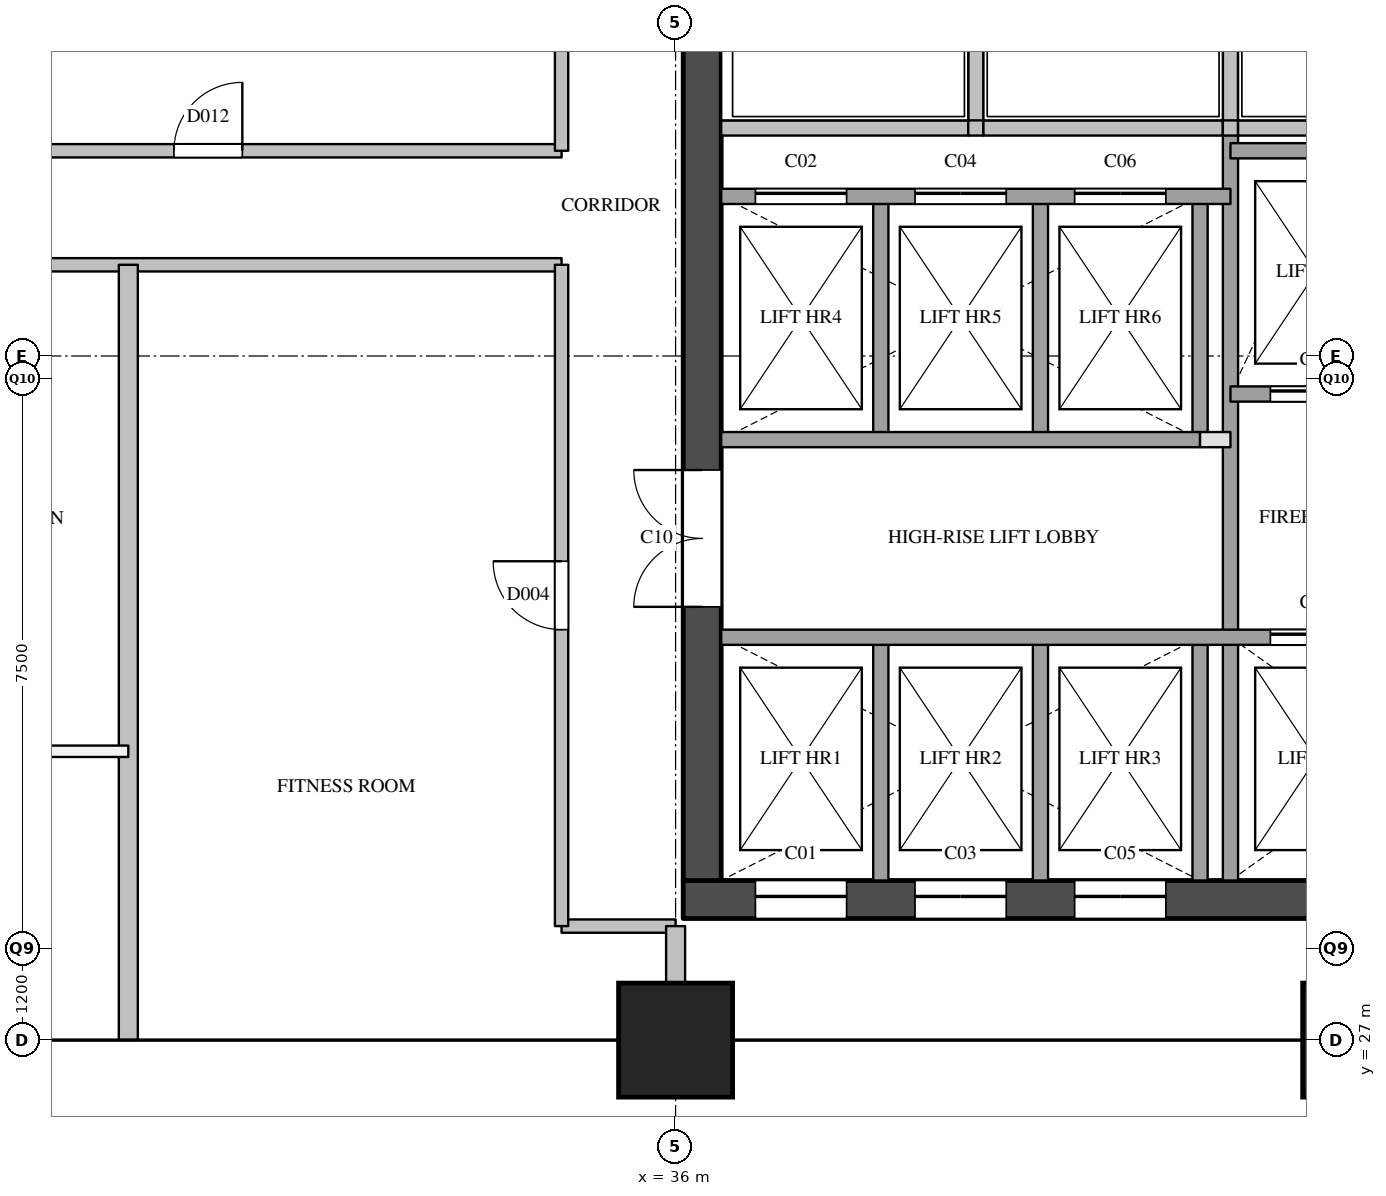
"""IFC4 building model, lengths in metres.
Left out: names, types, materials, properties, quantities, classifications, styles, units other than length and angle.
Written with IfcOpenShell. Run it as: python <this file> out.ifc"""

import sys

from ifc_helpers import new_model, si_unit, direction, frame, frame_2d, origin, origin_2d, place, context, subcontext, project, spatial, rectangle, extrude, element, fill, save


model = new_model("IFC4")
c1 = context("Model", 3, precision=1e-05, world=origin(), true_north=direction((0.0, 1.0)))
c2 = subcontext(c1, "Body", "Model", "MODEL_VIEW")
j1 = project(units=[si_unit("LENGTHUNIT", "METRE"), si_unit("PLANEANGLEUNIT", "RADIAN")], contexts=[c1])
p1 = place(None, origin())
s1 = spatial("IfcSite", under=j1, at=p1, CompositionType="ELEMENT")
p2 = place(p1, origin())
s2 = spatial("IfcBuilding", under=s1, at=p2, CompositionType="ELEMENT")
p3 = place(p2, frame((0.0, 0.0, 146.6)))
s3 = spatial("IfcBuildingStorey", under=s2, at=p3, CompositionType="ELEMENT", Elevation=146.6)
for number, where, z_axis, x_axis in (
    (1, (36.0, 27.0, 0.0), (0.0, 0.0, 1.0), (1.0, 0.0, 0.0)),
    (2, (45.0, 27.0, 0.0), (0.0, 0.0, 1.0), (1.0, 0.0, 0.0)),
):
    element("IfcColumn", number, at=place(p3, frame(where, z_axis=z_axis, x_axis=x_axis)), inside=s3, PredefinedType="COLUMN", context=c2, shape_type="SweptSolid", body=[
        extrude(rectangle(XDim=1.5, YDim=1.5, at=origin_2d()), origin(), (0.0, 0.0, 1.0), 3.9),
    ])
p4 = place(p3, frame((36.1, 28.85, 0.0), z_axis=(0.0, 0.0, 1.0), x_axis=(1.0, 0.0, 0.0)))
e3 = element("IfcWall", 3, at=p4, inside=s3, PredefinedType="SHEAR", context=c2, shape_type="SweptSolid", body=[
    extrude(rectangle(XDim=12.2, YDim=0.5, at=frame_2d((6.1, 0.0))), origin(), (0.0, 0.0, 1.0), 3.6),
])
p5 = place(p4, frame((0.95, 0.0, 0.0)))
e4 = element("IfcOpeningElement", 4, at=p5, cuts=e3, PredefinedType="OPENING", context=c2, shape_type="SweptSolid", body=[
    extrude(rectangle(XDim=1.2, YDim=2.1, at=frame_2d((0.6, 1.05))), frame((0.0, 0.26, 0.0), z_axis=(0.0, -1.0, 0.0), x_axis=(1.0, 0.0, 0.0)), (0.0, 0.0, 1.0), 0.52),
])
p6 = place(p4, frame((3.05, 0.0, 0.0)))
e5 = element("IfcOpeningElement", 5, at=p6, cuts=e3, PredefinedType="OPENING", context=c2, shape_type="SweptSolid", body=[
    extrude(rectangle(XDim=1.2, YDim=2.1, at=frame_2d((0.6, 1.05))), frame((0.0, 0.26, 0.0), z_axis=(0.0, -1.0, 0.0), x_axis=(1.0, 0.0, 0.0)), (0.0, 0.0, 1.0), 0.52),
])
p7 = place(p4, frame((5.15, 0.0, 0.0)))
e6 = element("IfcOpeningElement", 6, at=p7, cuts=e3, PredefinedType="OPENING", context=c2, shape_type="SweptSolid", body=[
    extrude(rectangle(XDim=1.2, YDim=2.1, at=frame_2d((0.6, 1.05))), frame((0.0, 0.26, 0.0), z_axis=(0.0, -1.0, 0.0), x_axis=(1.0, 0.0, 0.0)), (0.0, 0.0, 1.0), 0.52),
])
p8 = place(p3, frame((36.35, 29.1, 0.0), z_axis=(0.0, 0.0, 1.0), x_axis=(0.0, 1.0, 0.0)))
e7 = element("IfcWall", 7, at=p8, inside=s3, PredefinedType="SHEAR", context=c2, shape_type="SweptSolid", body=[
    extrude(rectangle(XDim=20.3, YDim=0.5, at=frame_2d((10.15, 0.0))), origin(), (0.0, 0.0, 1.0), 3.6),
])
p9 = place(p8, frame((3.6, 0.0, 0.0)))
e8 = element("IfcOpeningElement", 8, at=p9, cuts=e7, PredefinedType="OPENING", context=c2, shape_type="SweptSolid", body=[
    extrude(rectangle(XDim=1.8, YDim=2.1, at=frame_2d((0.9, 1.05))), frame((0.0, 0.26, 0.0), z_axis=(0.0, -1.0, 0.0), x_axis=(1.0, 0.0, 0.0)), (0.0, 0.0, 1.0), 0.52),
])
p10 = place(p8, frame((16.4, 0.0, 0.0)))
e9 = element("IfcOpeningElement", 9, at=p10, cuts=e7, PredefinedType="OPENING", context=c2, shape_type="SweptSolid", body=[
    extrude(rectangle(XDim=1.0, YDim=2.1, at=frame_2d((0.5, 1.05))), frame((0.0, 0.26, 0.0), z_axis=(0.0, -1.0, 0.0), x_axis=(1.0, 0.0, 0.0)), (0.0, 0.0, 1.0), 0.52),
])
p11 = place(p3, frame((38.7, 29.1, 0.0), z_axis=(0.0, 0.0, 1.0), x_axis=(0.0, 1.0, 0.0)))
e10 = element("IfcWall", 10, at=p11, inside=s3, PredefinedType="SOLIDWALL", context=c2, shape_type="SweptSolid", body=[
    extrude(rectangle(XDim=3.2, YDim=0.2, at=frame_2d((1.6, 0.0))), origin(), (0.0, 0.0, 1.0), 3.6),
])
p12 = place(p3, frame((38.7, 34.9, 0.0), z_axis=(0.0, 0.0, 1.0), x_axis=(0.0, 1.0, 0.0)))
e11 = element("IfcWall", 11, at=p12, inside=s3, PredefinedType="SOLIDWALL", context=c2, shape_type="SweptSolid", body=[
    extrude(rectangle(XDim=3.2, YDim=0.2, at=frame_2d((1.6, 0.0))), origin(), (0.0, 0.0, 1.0), 3.6),
])
p13 = place(p3, frame((39.95, 39.0, 0.0), z_axis=(0.0, 0.0, 1.0), x_axis=(0.0, 1.0, 0.0)))
e12 = element("IfcWall", 12, at=p13, inside=s3, PredefinedType="SOLIDWALL", context=c2, shape_type="SweptSolid", body=[
    extrude(rectangle(XDim=1.78, YDim=0.2, at=frame_2d((0.89, 0.0))), origin(), (0.0, 0.0, 1.0), 3.6),
])
p14 = place(p3, frame((40.8, 29.1, 0.0), z_axis=(0.0, 0.0, 1.0), x_axis=(0.0, 1.0, 0.0)))
e13 = element("IfcWall", 13, at=p14, inside=s3, PredefinedType="SOLIDWALL", context=c2, shape_type="SweptSolid", body=[
    extrude(rectangle(XDim=3.2, YDim=0.2, at=frame_2d((1.6, 0.0))), origin(), (0.0, 0.0, 1.0), 3.6),
])
p15 = place(p3, frame((40.8, 34.9, 0.0), z_axis=(0.0, 0.0, 1.0), x_axis=(0.0, 1.0, 0.0)))
e14 = element("IfcWall", 14, at=p15, inside=s3, PredefinedType="SOLIDWALL", context=c2, shape_type="SweptSolid", body=[
    extrude(rectangle(XDim=3.2, YDim=0.2, at=frame_2d((1.6, 0.0))), origin(), (0.0, 0.0, 1.0), 3.6),
])
p16 = place(p3, frame((42.9, 29.1, 0.0), z_axis=(0.0, 0.0, 1.0), x_axis=(0.0, 1.0, 0.0)))
e15 = element("IfcWall", 15, at=p16, inside=s3, PredefinedType="SOLIDWALL", context=c2, shape_type="SweptSolid", body=[
    extrude(rectangle(XDim=3.2, YDim=0.2, at=frame_2d((1.6, 0.0))), origin(), (0.0, 0.0, 1.0), 3.6),
])
p17 = place(p3, frame((42.9, 34.9, 0.0), z_axis=(0.0, 0.0, 1.0), x_axis=(0.0, 1.0, 0.0)))
e16 = element("IfcWall", 16, at=p17, inside=s3, PredefinedType="SOLIDWALL", context=c2, shape_type="SweptSolid", body=[
    extrude(rectangle(XDim=3.2, YDim=0.2, at=frame_2d((1.6, 0.0))), origin(), (0.0, 0.0, 1.0), 3.6),
])
p18 = place(p3, frame((43.3, 29.1, 0.0), z_axis=(0.0, 0.0, 1.0), x_axis=(0.0, 1.0, 0.0)))
e17 = element("IfcWall", 17, at=p18, inside=s3, PredefinedType="SOLIDWALL", context=c2, shape_type="SweptSolid", body=[
    extrude(rectangle(XDim=9.9, YDim=0.2, at=frame_2d((4.95, 0.0))), origin(), (0.0, 0.0, 1.0), 3.6),
])
p19 = place(p3, frame((43.3, 39.0, 0.0), z_axis=(0.0, 0.0, 1.0), x_axis=(0.0, 1.0, 0.0)))
e18 = element("IfcWall", 18, at=p19, inside=s3, PredefinedType="SOLIDWALL", context=c2, shape_type="SweptSolid", body=[
    extrude(rectangle(XDim=1.78, YDim=0.2, at=frame_2d((0.89, 0.0))), origin(), (0.0, 0.0, 1.0), 3.6),
])
p20 = place(p3, frame((36.6, 32.3, 0.0), z_axis=(0.0, 0.0, 1.0), x_axis=(1.0, 0.0, 0.0)))
e19 = element("IfcWall", 19, at=p20, inside=s3, PredefinedType="SOLIDWALL", context=c2, shape_type="SweptSolid", body=[
    extrude(rectangle(XDim=11.2, YDim=0.2, at=frame_2d((5.6, 0.0))), origin(), (0.0, 0.0, 1.0), 3.6),
])
p21 = place(p20, frame((7.225, 0.0, 0.0)))
e20 = element("IfcOpeningElement", 20, at=p21, cuts=e19, PredefinedType="OPENING", context=c2, shape_type="SweptSolid", body=[
    extrude(rectangle(XDim=1.2, YDim=2.1, at=frame_2d((0.6, 1.05))), frame((0.0, 0.11, 0.0), z_axis=(0.0, -1.0, 0.0), x_axis=(1.0, 0.0, 0.0)), (0.0, 0.0, 1.0), 0.22),
])
p22 = place(p20, frame((9.475, 0.0, 0.0)))
e21 = element("IfcOpeningElement", 21, at=p22, cuts=e19, PredefinedType="OPENING", context=c2, shape_type="SweptSolid", body=[
    extrude(rectangle(XDim=1.2, YDim=2.1, at=frame_2d((0.6, 1.05))), frame((0.0, 0.11, 0.0), z_axis=(0.0, -1.0, 0.0), x_axis=(1.0, 0.0, 0.0)), (0.0, 0.0, 1.0), 0.22),
])
p23 = place(p3, frame((42.9, 34.9, 0.0), z_axis=(0.0, 0.0, 1.0), x_axis=(1.0, 0.0, 0.0)))
e22 = element("IfcWall", 22, at=p23, inside=s3, PredefinedType="PARTITIONING", context=c2, shape_type="SweptSolid", body=[
    extrude(rectangle(XDim=0.4, YDim=0.2, at=frame_2d((0.2, 0.0))), origin(), (0.0, 0.0, 1.0), 3.6),
])
p24 = place(p3, frame((36.6, 34.9, 0.0), z_axis=(0.0, 0.0, 1.0), x_axis=(1.0, 0.0, 0.0)))
e23 = element("IfcWall", 23, at=p24, inside=s3, PredefinedType="SOLIDWALL", context=c2, shape_type="SweptSolid", body=[
    extrude(rectangle(XDim=6.3, YDim=0.2, at=frame_2d((3.15, 0.0))), origin(), (0.0, 0.0, 1.0), 3.6),
])
p25 = place(p3, frame((43.3, 35.5, 0.0), z_axis=(0.0, 0.0, 1.0), x_axis=(1.0, 0.0, 0.0)))
e24 = element("IfcWall", 24, at=p25, inside=s3, PredefinedType="SOLIDWALL", context=c2, shape_type="SweptSolid", body=[
    extrude(rectangle(XDim=4.5, YDim=0.2, at=frame_2d((2.25, 0.0))), origin(), (0.0, 0.0, 1.0), 3.6),
])
p26 = place(p25, frame((0.525, 0.0, 0.0)))
e25 = element("IfcOpeningElement", 25, at=p26, cuts=e24, PredefinedType="OPENING", context=c2, shape_type="SweptSolid", body=[
    extrude(rectangle(XDim=1.2, YDim=2.1, at=frame_2d((0.6, 1.05))), frame((0.0, 0.11, 0.0), z_axis=(0.0, -1.0, 0.0), x_axis=(1.0, 0.0, 0.0)), (0.0, 0.0, 1.0), 0.22),
])
p27 = place(p25, frame((3.025, 0.0, 0.0)))
e26 = element("IfcOpeningElement", 26, at=p27, cuts=e24, PredefinedType="OPENING", context=c2, shape_type="SweptSolid", body=[
    extrude(rectangle(XDim=0.7, YDim=2.1, at=frame_2d((0.35, 1.05))), frame((0.0, 0.11, 0.0), z_axis=(0.0, -1.0, 0.0), x_axis=(1.0, 0.0, 0.0)), (0.0, 0.0, 1.0), 0.22),
])
p28 = place(p3, frame((36.6, 38.1, 0.0), z_axis=(0.0, 0.0, 1.0), x_axis=(1.0, 0.0, 0.0)))
e27 = element("IfcWall", 27, at=p28, inside=s3, PredefinedType="SOLIDWALL", context=c2, shape_type="SweptSolid", body=[
    extrude(rectangle(XDim=6.7, YDim=0.2, at=frame_2d((3.35, 0.0))), origin(), (0.0, 0.0, 1.0), 3.6),
])
p29 = place(p28, frame((0.45, 0.0, 0.0)))
e28 = element("IfcOpeningElement", 28, at=p29, cuts=e27, PredefinedType="OPENING", context=c2, shape_type="SweptSolid", body=[
    extrude(rectangle(XDim=1.2, YDim=2.1, at=frame_2d((0.6, 1.05))), frame((0.0, 0.11, 0.0), z_axis=(0.0, -1.0, 0.0), x_axis=(1.0, 0.0, 0.0)), (0.0, 0.0, 1.0), 0.22),
])
p30 = place(p28, frame((2.55, 0.0, 0.0)))
e29 = element("IfcOpeningElement", 29, at=p30, cuts=e27, PredefinedType="OPENING", context=c2, shape_type="SweptSolid", body=[
    extrude(rectangle(XDim=1.2, YDim=2.1, at=frame_2d((0.6, 1.05))), frame((0.0, 0.11, 0.0), z_axis=(0.0, -1.0, 0.0), x_axis=(1.0, 0.0, 0.0)), (0.0, 0.0, 1.0), 0.22),
])
p31 = place(p28, frame((4.65, 0.0, 0.0)))
e30 = element("IfcOpeningElement", 30, at=p31, cuts=e27, PredefinedType="OPENING", context=c2, shape_type="SweptSolid", body=[
    extrude(rectangle(XDim=1.2, YDim=2.1, at=frame_2d((0.6, 1.05))), frame((0.0, 0.11, 0.0), z_axis=(0.0, -1.0, 0.0), x_axis=(1.0, 0.0, 0.0)), (0.0, 0.0, 1.0), 0.22),
])
p32 = place(p3, frame((43.3, 38.7, 0.0), z_axis=(0.0, 0.0, 1.0), x_axis=(1.0, 0.0, 0.0)))
e31 = element("IfcWall", 31, at=p32, inside=s3, PredefinedType="SOLIDWALL", context=c2, shape_type="SweptSolid", body=[
    extrude(rectangle(XDim=4.5, YDim=0.2, at=frame_2d((2.25, 0.0))), origin(), (0.0, 0.0, 1.0), 3.6),
])
p33 = place(p3, frame((36.6, 39.0, 0.0), z_axis=(0.0, 0.0, 1.0), x_axis=(1.0, 0.0, 0.0)))
e32 = element("IfcWall", 32, at=p33, inside=s3, PredefinedType="SOLIDWALL", context=c2, shape_type="SweptSolid", body=[
    extrude(rectangle(XDim=3.25, YDim=0.2, at=frame_2d((1.625, 0.0))), origin(), (0.0, 0.0, 1.0), 3.6),
])
p34 = place(p3, frame((39.85, 39.0, 0.0), z_axis=(0.0, 0.0, 1.0), x_axis=(1.0, 0.0, 0.0)))
e33 = element("IfcWall", 33, at=p34, inside=s3, PredefinedType="SOLIDWALL", context=c2, shape_type="SweptSolid", body=[
    extrude(rectangle(XDim=0.2, YDim=0.2, at=frame_2d((0.1, 0.0))), origin(), (0.0, 0.0, 1.0), 3.6),
])
p35 = place(p3, frame((40.05, 39.0, 0.0), z_axis=(0.0, 0.0, 1.0), x_axis=(1.0, 0.0, 0.0)))
e34 = element("IfcWall", 34, at=p35, inside=s3, PredefinedType="SOLIDWALL", context=c2, shape_type="SweptSolid", body=[
    extrude(rectangle(XDim=3.15, YDim=0.2, at=frame_2d((1.575, 0.0))), origin(), (0.0, 0.0, 1.0), 3.6),
])
p36 = place(p3, frame((43.2, 39.0, 0.0), z_axis=(0.0, 0.0, 1.0), x_axis=(1.0, 0.0, 0.0)))
e35 = element("IfcWall", 35, at=p36, inside=s3, PredefinedType="SOLIDWALL", context=c2, shape_type="SweptSolid", body=[
    extrude(rectangle(XDim=0.2, YDim=0.2, at=frame_2d((0.1, 0.0))), origin(), (0.0, 0.0, 1.0), 3.6),
])
p37 = place(p3, frame((43.4, 39.0, 0.0), z_axis=(0.0, 0.0, 1.0), x_axis=(1.0, 0.0, 0.0)))
e36 = element("IfcWall", 36, at=p37, inside=s3, PredefinedType="SOLIDWALL", context=c2, shape_type="SweptSolid", body=[
    extrude(rectangle(XDim=3.25, YDim=0.2, at=frame_2d((1.625, 0.0))), origin(), (0.0, 0.0, 1.0), 3.6),
])
p38 = place(p3, frame((34.5, 28.5, 0.0), z_axis=(0.0, 0.0, 1.0), x_axis=(1.0, 0.0, 0.0)))
e37 = element("IfcWall", 37, at=p38, inside=s3, PredefinedType="PARTITIONING", context=c2, shape_type="SweptSolid", body=[
    extrude(rectangle(XDim=1.5, YDim=0.175, at=frame_2d((0.75, 0.0))), origin(), (0.0, 0.0, 1.0), 3.6),
])
p39 = place(p3, frame((19.5, 37.2, 0.0), z_axis=(0.0, 0.0, 1.0), x_axis=(1.0, 0.0, 0.0)))
e38 = element("IfcWall", 38, at=p39, inside=s3, PredefinedType="PARTITIONING", context=c2, shape_type="SweptSolid", body=[
    extrude(rectangle(XDim=15.0, YDim=0.175, at=frame_2d((7.5, 0.0))), origin(), (0.0, 0.0, 1.0), 2.6),
])
p40 = place(p39, frame((2.5, 0.0, 0.0)))
e39 = element("IfcOpeningElement", 39, at=p40, cuts=e38, PredefinedType="OPENING", context=c2, shape_type="SweptSolid", body=[
    extrude(rectangle(XDim=1.0, YDim=2.1, at=frame_2d((0.5, 1.05))), frame((0.0, 0.097, 0.0), z_axis=(0.0, -1.0, 0.0), x_axis=(1.0, 0.0, 0.0)), (0.0, 0.0, 1.0), 0.195),
])
p41 = place(p3, frame((19.5, 38.7, 0.0), z_axis=(0.0, 0.0, 1.0), x_axis=(1.0, 0.0, 0.0)))
e40 = element("IfcWall", 40, at=p41, inside=s3, PredefinedType="PARTITIONING", context=c2, shape_type="SweptSolid", body=[
    extrude(rectangle(XDim=15.0, YDim=0.175, at=frame_2d((7.5, 0.0))), origin(), (0.0, 0.0, 1.0), 2.6),
])
p42 = place(p41, frame((9.9, 0.0, 0.0)))
e41 = element("IfcOpeningElement", 41, at=p42, cuts=e40, PredefinedType="OPENING", context=c2, shape_type="SweptSolid", body=[
    extrude(rectangle(XDim=0.9, YDim=2.1, at=frame_2d((0.45, 1.05))), frame((0.0, 0.097, 0.0), z_axis=(0.0, -1.0, 0.0), x_axis=(1.0, 0.0, 0.0)), (0.0, 0.0, 1.0), 0.195),
])
p43 = place(p3, frame((34.5, 28.5, 0.0), z_axis=(0.0, 0.0, 1.0), x_axis=(0.0, 1.0, 0.0)))
e42 = element("IfcWall", 42, at=p43, inside=s3, PredefinedType="PARTITIONING", context=c2, shape_type="SweptSolid", body=[
    extrude(rectangle(XDim=8.7, YDim=0.175, at=frame_2d((4.35, 0.0))), origin(), (0.0, 0.0, 1.0), 3.6),
])
p44 = place(p43, frame((3.9, 0.0, 0.0)))
e43 = element("IfcOpeningElement", 43, at=p44, cuts=e42, PredefinedType="OPENING", context=c2, shape_type="SweptSolid", body=[
    extrude(rectangle(XDim=0.9, YDim=2.1, at=frame_2d((0.45, 1.05))), frame((0.0, 0.097, 0.0), z_axis=(0.0, -1.0, 0.0), x_axis=(1.0, 0.0, 0.0)), (0.0, 0.0, 1.0), 0.195),
])
p45 = place(p3, frame((34.5, 38.7, 0.0), z_axis=(0.0, 0.0, 1.0), x_axis=(0.0, 1.0, 0.0)))
e44 = element("IfcWall", 44, at=p45, inside=s3, PredefinedType="PARTITIONING", context=c2, shape_type="SweptSolid", body=[
    extrude(rectangle(XDim=12.8, YDim=0.175, at=frame_2d((6.4, 0.0))), origin(), (0.0, 0.0, 1.0), 3.6),
])
p46 = place(p45, frame((10.0, 0.0, 0.0)))
e45 = element("IfcOpeningElement", 45, at=p46, cuts=e44, PredefinedType="OPENING", context=c2, shape_type="SweptSolid", body=[
    extrude(rectangle(XDim=0.9, YDim=2.1, at=frame_2d((0.45, 1.05))), frame((0.0, 0.097, 0.0), z_axis=(0.0, -1.0, 0.0), x_axis=(1.0, 0.0, 0.0)), (0.0, 0.0, 1.0), 0.195),
])
p47 = place(p3, frame((25.8, 30.8, 0.0), z_axis=(0.0, 0.0, 1.0), x_axis=(1.0, 0.0, 0.0)))
e46 = element("IfcWall", 46, at=p47, inside=s3, PredefinedType="PARTITIONING", context=c2, shape_type="SweptSolid", body=[
    extrude(rectangle(XDim=3.0, YDim=0.15, at=frame_2d((1.5, 0.0))), origin(), (0.0, 0.0, 1.0), 2.6),
])
p48 = place(p3, frame((28.8, 27.0, 0.0), z_axis=(0.0, 0.0, 1.0), x_axis=(0.0, 1.0, 0.0)))
e47 = element("IfcWall", 47, at=p48, inside=s3, PredefinedType="PARTITIONING", context=c2, shape_type="SweptSolid", body=[
    extrude(rectangle(XDim=10.2, YDim=0.25, at=frame_2d((5.1, 0.0))), origin(), (0.0, 0.0, 1.0), 2.6),
])
p49 = place(p3, frame((36.0, 27.0, 0.0), z_axis=(0.0, 0.0, 1.0), x_axis=(0.0, 1.0, 0.0)))
e48 = element("IfcWall", 48, at=p49, inside=s3, PredefinedType="PARTITIONING", context=c2, shape_type="SweptSolid", body=[
    extrude(rectangle(XDim=1.5, YDim=0.25, at=frame_2d((0.75, 0.0))), origin(), (0.0, 0.0, 1.0), 3.6),
])
p50 = place(p5, origin())
e49 = element("IfcDoor", 49, at=p50, inside=s3, OperationType="SLIDING_TO_LEFT", PredefinedType="DOOR", context=c2, shape_type="SweptSolid", body=[
    extrude(rectangle(XDim=1.2, YDim=2.1, at=frame_2d((0.6, 1.05))), frame((0.0, 0.025, 0.0), z_axis=(0.0, -1.0, 0.0), x_axis=(1.0, 0.0, 0.0)), (0.0, 0.0, 1.0), 0.05),
])
fill(e4, e49)
p51 = place(p29, origin())
e50 = element("IfcDoor", 50, at=p51, inside=s3, OperationType="SLIDING_TO_LEFT", PredefinedType="DOOR", context=c2, shape_type="SweptSolid", body=[
    extrude(rectangle(XDim=1.2, YDim=2.1, at=frame_2d((0.6, 1.05))), frame((0.0, 0.025, 0.0), z_axis=(0.0, -1.0, 0.0), x_axis=(1.0, 0.0, 0.0)), (0.0, 0.0, 1.0), 0.05),
])
fill(e28, e50)
p52 = place(p6, origin())
e51 = element("IfcDoor", 51, at=p52, inside=s3, OperationType="SLIDING_TO_LEFT", PredefinedType="DOOR", context=c2, shape_type="SweptSolid", body=[
    extrude(rectangle(XDim=1.2, YDim=2.1, at=frame_2d((0.6, 1.05))), frame((0.0, 0.025, 0.0), z_axis=(0.0, -1.0, 0.0), x_axis=(1.0, 0.0, 0.0)), (0.0, 0.0, 1.0), 0.05),
])
fill(e5, e51)
p53 = place(p30, origin())
e52 = element("IfcDoor", 52, at=p53, inside=s3, OperationType="SLIDING_TO_LEFT", PredefinedType="DOOR", context=c2, shape_type="SweptSolid", body=[
    extrude(rectangle(XDim=1.2, YDim=2.1, at=frame_2d((0.6, 1.05))), frame((0.0, 0.025, 0.0), z_axis=(0.0, -1.0, 0.0), x_axis=(1.0, 0.0, 0.0)), (0.0, 0.0, 1.0), 0.05),
])
fill(e29, e52)
p54 = place(p7, origin())
e53 = element("IfcDoor", 53, at=p54, inside=s3, OperationType="SLIDING_TO_LEFT", PredefinedType="DOOR", context=c2, shape_type="SweptSolid", body=[
    extrude(rectangle(XDim=1.2, YDim=2.1, at=frame_2d((0.6, 1.05))), frame((0.0, 0.025, 0.0), z_axis=(0.0, -1.0, 0.0), x_axis=(1.0, 0.0, 0.0)), (0.0, 0.0, 1.0), 0.05),
])
fill(e6, e53)
p55 = place(p31, origin())
e54 = element("IfcDoor", 54, at=p55, inside=s3, OperationType="SLIDING_TO_LEFT", PredefinedType="DOOR", context=c2, shape_type="SweptSolid", body=[
    extrude(rectangle(XDim=1.2, YDim=2.1, at=frame_2d((0.6, 1.05))), frame((0.0, 0.025, 0.0), z_axis=(0.0, -1.0, 0.0), x_axis=(1.0, 0.0, 0.0)), (0.0, 0.0, 1.0), 0.05),
])
fill(e30, e54)
p56 = place(p21, origin())
e55 = element("IfcDoor", 55, at=p56, inside=s3, OperationType="SLIDING_TO_LEFT", PredefinedType="DOOR", context=c2, shape_type="SweptSolid", body=[
    extrude(rectangle(XDim=1.2, YDim=2.1, at=frame_2d((0.6, 1.05))), frame((0.0, 0.025, 0.0), z_axis=(0.0, -1.0, 0.0), x_axis=(1.0, 0.0, 0.0)), (0.0, 0.0, 1.0), 0.05),
])
fill(e20, e55)
p57 = place(p26, origin())
e56 = element("IfcDoor", 56, at=p57, inside=s3, OperationType="SLIDING_TO_LEFT", PredefinedType="DOOR", context=c2, shape_type="SweptSolid", body=[
    extrude(rectangle(XDim=1.2, YDim=2.1, at=frame_2d((0.6, 1.05))), frame((0.0, 0.025, 0.0), z_axis=(0.0, -1.0, 0.0), x_axis=(1.0, 0.0, 0.0)), (0.0, 0.0, 1.0), 0.05),
])
fill(e25, e56)
p58 = place(p9, origin())
e57 = element("IfcDoor", 57, at=p58, inside=s3, OperationType="DOUBLE_DOOR_SINGLE_SWING", PredefinedType="DOOR", context=c2, shape_type="SweptSolid", body=[
    extrude(rectangle(XDim=1.8, YDim=2.1, at=frame_2d((0.9, 1.05))), frame((0.0, 0.025, 0.0), z_axis=(0.0, -1.0, 0.0), x_axis=(1.0, 0.0, 0.0)), (0.0, 0.0, 1.0), 0.05),
])
fill(e8, e57)
p59 = place(p44, origin())
e58 = element("IfcDoor", 58, at=p59, inside=s3, OperationType="SINGLE_SWING_RIGHT", PredefinedType="DOOR", context=c2, shape_type="SweptSolid", body=[
    extrude(rectangle(XDim=0.9, YDim=2.1, at=frame_2d((0.45, 1.05))), frame((0.0, 0.025, 0.0), z_axis=(0.0, -1.0, 0.0), x_axis=(1.0, 0.0, 0.0)), (0.0, 0.0, 1.0), 0.05),
])
fill(e43, e58)
p60 = place(p42, origin())
e59 = element("IfcDoor", 59, at=p60, inside=s3, OperationType="SINGLE_SWING_RIGHT", PredefinedType="DOOR", context=c2, shape_type="SweptSolid", body=[
    extrude(rectangle(XDim=0.9, YDim=2.1, at=frame_2d((0.45, 1.05))), frame((0.0, 0.025, 0.0), z_axis=(0.0, -1.0, 0.0), x_axis=(1.0, 0.0, 0.0)), (0.0, 0.0, 1.0), 0.05),
])
fill(e41, e59)
save(model, sys.argv[1])
